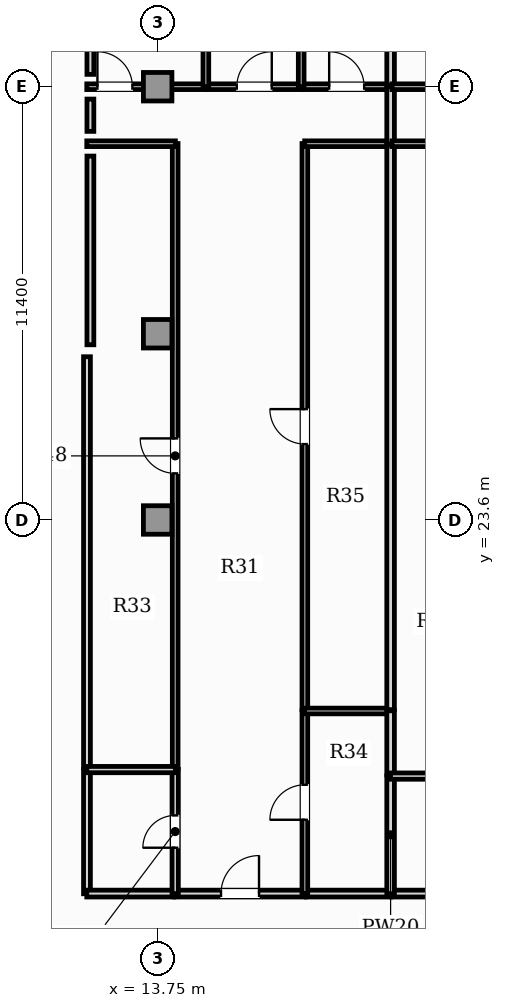
"""IFC4 building model, lengths in metres.
Left out: names, types, materials, properties, quantities, classifications, styles, units other than length and angle.
Written with IfcOpenShell. Run it as: python <this file> out.ifc"""

import sys

from ifc_helpers import new_model, si_unit, direction, frame, frame_2d, origin, origin_2d, place, context, subcontext, project, spatial, rectangle, extrude, element, fill, save


model = new_model("IFC4")
c1 = context("Model", 3, precision=1e-05, world=origin(), true_north=direction((0.0, 1.0)))
c2 = subcontext(c1, "Body", "Model", "MODEL_VIEW")
j1 = project(units=[si_unit("LENGTHUNIT", "METRE"), si_unit("PLANEANGLEUNIT", "RADIAN")], contexts=[c1])
p1 = place(None, origin())
s1 = spatial("IfcSite", under=j1, at=p1, CompositionType="ELEMENT")
p2 = place(p1, origin())
s2 = spatial("IfcBuilding", under=s1, at=p2, CompositionType="ELEMENT")
p3 = place(p2, frame((0.0, 0.0, 119.55)))
s3 = spatial("IfcBuildingStorey", under=s2, at=p3, CompositionType="ELEMENT", Elevation=119.55)
for number, where, z_axis, x_axis in (
    (1, (13.75, 23.6, 0.0), (0.0, 0.0, 1.0), (1.0, 0.0, 0.0)),
    (2, (13.75, 28.5, 0.0), (0.0, 0.0, 1.0), (1.0, 0.0, 0.0)),
    (3, (13.75, 35.0, 0.0), (0.0, 0.0, 1.0), (1.0, 0.0, 0.0)),
):
    element("IfcColumn", number, at=place(p3, frame(where, z_axis=z_axis, x_axis=x_axis)), inside=s3, PredefinedType="COLUMN", context=c2, shape_type="SweptSolid", body=[
        extrude(rectangle(XDim=0.75, YDim=0.75, at=origin_2d()), origin(), (0.0, 0.0, 1.0), 3.85),
    ])
p4 = place(p3, frame((14.206, 13.77, 0.0), z_axis=(0.0, 0.0, 1.0), x_axis=(1.0, 0.0, 0.0)))
e4 = element("IfcWall", 4, at=p4, inside=s3, PredefinedType="PARTITIONING", context=c2, shape_type="SweptSolid", body=[
    extrude(rectangle(XDim=3.422, YDim=0.18, at=frame_2d((1.711, 0.0))), origin(), (0.0, 0.0, 1.0), 3.6),
])
p5 = place(p4, frame((1.211, 0.0, 0.0)))
e5 = element("IfcOpeningElement", 5, at=p5, cuts=e4, PredefinedType="OPENING", context=c2, shape_type="SweptSolid", body=[
    extrude(rectangle(XDim=1.0, YDim=2.15, at=frame_2d((0.5, 1.075))), frame((0.0, 0.1, 0.0), z_axis=(0.0, -1.0, 0.0), x_axis=(1.0, 0.0, 0.0)), (0.0, 0.0, 1.0), 0.2),
])
p6 = place(p3, frame((11.89, 13.765, 0.0), z_axis=(0.0, 0.0, 1.0), x_axis=(0.0, 1.0, 0.0)))
e6 = element("IfcWall", 6, at=p6, inside=s3, PredefinedType="PARTITIONING", context=c2, shape_type="SweptSolid", body=[
    extrude(rectangle(XDim=3.273, YDim=0.18, at=frame_2d((1.636, 0.0))), origin(), (0.0, 0.0, 1.0), 3.6),
])
p7 = place(p3, frame((11.885, 13.77, 0.0), z_axis=(0.0, 0.0, 1.0), x_axis=(1.0, 0.0, 0.0)))
e7 = element("IfcWall", 7, at=p7, inside=s3, PredefinedType="PARTITIONING", context=c2, shape_type="SweptSolid", body=[
    extrude(rectangle(XDim=2.291, YDim=0.18, at=frame_2d((1.146, 0.0))), origin(), (0.0, 0.0, 1.0), 3.6),
])
p8 = place(p3, frame((11.89, 17.068, 0.0), z_axis=(0.0, 0.0, 1.0), x_axis=(0.0, 1.0, 0.0)))
e8 = element("IfcWall", 8, at=p8, inside=s3, PredefinedType="PARTITIONING", context=c2, shape_type="SweptSolid", body=[
    extrude(rectangle(XDim=10.827, YDim=0.18, at=frame_2d((5.414, 0.0))), origin(), (0.0, 0.0, 1.0), 3.6),
])
p9 = place(p3, frame((17.658, 13.77, 0.0), z_axis=(0.0, 0.0, 1.0), x_axis=(1.0, 0.0, 0.0)))
e9 = element("IfcWall", 9, at=p9, inside=s3, PredefinedType="PARTITIONING", context=c2, shape_type="SweptSolid", body=[
    extrude(rectangle(XDim=2.226, YDim=0.18, at=frame_2d((1.113, 0.0))), origin(), (0.0, 0.0, 1.0), 3.6),
])
p10 = place(p3, frame((19.914, 13.77, 0.0), z_axis=(0.0, 0.0, 1.0), x_axis=(1.0, 0.0, 0.0)))
e10 = element("IfcWall", 10, at=p10, inside=s3, PredefinedType="PARTITIONING", context=c2, shape_type="SweptSolid", body=[
    extrude(rectangle(XDim=2.377, YDim=0.18, at=frame_2d((1.188, 0.0))), origin(), (0.0, 0.0, 1.0), 3.6),
])
p11 = place(p3, frame((14.211, 13.765, 0.0), z_axis=(0.0, 0.0, 1.0), x_axis=(0.0, 1.0, 0.0)))
e11 = element("IfcWall", 11, at=p11, inside=s3, PredefinedType="PLUMBINGWALL", context=c2, shape_type="SweptSolid", body=[
    extrude(rectangle(XDim=3.273, YDim=0.165, at=frame_2d((1.636, 0.0))), origin(), (0.0, 0.0, 1.0), 3.6),
])
p12 = place(p11, frame((1.211, 0.0, 0.0)))
e12 = element("IfcOpeningElement", 12, at=p12, cuts=e11, PredefinedType="OPENING", context=c2, shape_type="SweptSolid", body=[
    extrude(rectangle(XDim=0.85, YDim=2.1, at=frame_2d((0.425, 1.05))), frame((0.0, 0.093, 0.0), z_axis=(0.0, -1.0, 0.0), x_axis=(1.0, 0.0, 0.0)), (0.0, 0.0, 1.0), 0.185),
])
p13 = place(p3, frame((14.211, 17.068, 0.0), z_axis=(0.0, 0.0, 1.0), x_axis=(0.0, 1.0, 0.0)))
e13 = element("IfcWall", 13, at=p13, inside=s3, PredefinedType="PARTITIONING", context=c2, shape_type="SweptSolid", body=[
    extrude(rectangle(XDim=16.437, YDim=0.15, at=frame_2d((8.219, 0.0))), origin(), (0.0, 0.0, 1.0), 3.6),
])
p14 = place(p13, frame((7.759, 0.0, 0.0)))
e14 = element("IfcOpeningElement", 14, at=p14, cuts=e13, PredefinedType="OPENING", context=c2, shape_type="SweptSolid", body=[
    extrude(rectangle(XDim=0.92, YDim=2.1, at=frame_2d((0.46, 1.05))), frame((0.0, 0.085, 0.0), z_axis=(0.0, -1.0, 0.0), x_axis=(1.0, 0.0, 0.0)), (0.0, 0.0, 1.0), 0.17),
])
p15 = place(p3, frame((11.885, 33.5, 0.0), z_axis=(0.0, 0.0, 1.0), x_axis=(1.0, 0.0, 0.0)))
e15 = element("IfcWall", 15, at=p15, inside=s3, PredefinedType="PARTITIONING", context=c2, shape_type="SweptSolid", body=[
    extrude(rectangle(XDim=2.331, YDim=0.15, at=frame_2d((1.166, 0.0))), origin(), (0.0, 0.0, 1.0), 3.6),
])
p16 = place(p3, frame((17.623, 13.765, 0.0), z_axis=(0.0, 0.0, 1.0), x_axis=(0.0, 1.0, 0.0)))
e16 = element("IfcWall", 16, at=p16, inside=s3, PredefinedType="PARTITIONING", context=c2, shape_type="SweptSolid", body=[
    extrude(rectangle(XDim=4.814, YDim=0.15, at=frame_2d((2.407, 0.0))), origin(), (0.0, 0.0, 1.0), 3.6),
])
p17 = place(p16, frame((1.947, 0.0, 0.0)))
e17 = element("IfcOpeningElement", 17, at=p17, cuts=e16, PredefinedType="OPENING", context=c2, shape_type="SweptSolid", body=[
    extrude(rectangle(XDim=0.92, YDim=2.1, at=frame_2d((0.46, 1.05))), frame((0.0, 0.085, 0.0), z_axis=(0.0, -1.0, 0.0), x_axis=(1.0, 0.0, 0.0)), (0.0, 0.0, 1.0), 0.17),
])
p18 = place(p3, frame((17.623, 18.609, 0.0), z_axis=(0.0, 0.0, 1.0), x_axis=(0.0, 1.0, 0.0)))
e18 = element("IfcWall", 18, at=p18, inside=s3, PredefinedType="PARTITIONING", context=c2, shape_type="SweptSolid", body=[
    extrude(rectangle(XDim=14.896, YDim=0.15, at=frame_2d((7.448, 0.0))), origin(), (0.0, 0.0, 1.0), 3.6),
])
p19 = place(p18, frame((6.988, 0.0, 0.0)))
e19 = element("IfcOpeningElement", 19, at=p19, cuts=e18, PredefinedType="OPENING", context=c2, shape_type="SweptSolid", body=[
    extrude(rectangle(XDim=0.92, YDim=2.1, at=frame_2d((0.46, 1.05))), frame((0.0, 0.085, 0.0), z_axis=(0.0, -1.0, 0.0), x_axis=(1.0, 0.0, 0.0)), (0.0, 0.0, 1.0), 0.17),
])
p20 = place(p3, frame((17.618, 33.5, 0.0), z_axis=(0.0, 0.0, 1.0), x_axis=(1.0, 0.0, 0.0)))
e20 = element("IfcWall", 20, at=p20, inside=s3, PredefinedType="PARTITIONING", context=c2, shape_type="SweptSolid", body=[
    extrude(rectangle(XDim=2.266, YDim=0.15, at=frame_2d((1.133, 0.0))), origin(), (0.0, 0.0, 1.0), 3.6),
])
p21 = place(p3, frame((11.885, 35.0, 0.0), z_axis=(0.0, 0.0, 1.0), x_axis=(1.0, 0.0, 0.0)))
e21 = element("IfcWall", 21, at=p21, inside=s3, PredefinedType="PARTITIONING", context=c2, shape_type="SweptSolid", body=[
    extrude(rectangle(XDim=3.139, YDim=0.15, at=frame_2d((1.569, 0.0))), origin(), (0.0, 0.0, 1.0), 2.983),
])
p22 = place(p21, frame((0.28, 0.0, 0.0)))
e22 = element("IfcOpeningElement", 22, at=p22, cuts=e21, PredefinedType="OPENING", context=c2, shape_type="SweptSolid", body=[
    extrude(rectangle(XDim=0.92, YDim=2.1, at=frame_2d((0.46, 1.05))), frame((0.0, 0.085, 0.0), z_axis=(0.0, -1.0, 0.0), x_axis=(1.0, 0.0, 0.0)), (0.0, 0.0, 1.0), 0.17),
])
p23 = place(p3, frame((15.054, 35.0, 0.0), z_axis=(0.0, 0.0, 1.0), x_axis=(1.0, 0.0, 0.0)))
e23 = element("IfcWall", 23, at=p23, inside=s3, PredefinedType="PARTITIONING", context=c2, shape_type="SweptSolid", body=[
    extrude(rectangle(XDim=2.478, YDim=0.15, at=frame_2d((1.239, 0.0))), origin(), (0.0, 0.0, 1.0), 2.983),
])
p24 = place(p23, frame((0.779, 0.0, 0.0)))
e24 = element("IfcOpeningElement", 24, at=p24, cuts=e23, PredefinedType="OPENING", context=c2, shape_type="SweptSolid", body=[
    extrude(rectangle(XDim=0.92, YDim=2.1, at=frame_2d((0.46, 1.05))), frame((0.0, 0.085, 0.0), z_axis=(0.0, -1.0, 0.0), x_axis=(1.0, 0.0, 0.0)), (0.0, 0.0, 1.0), 0.17),
])
p25 = place(p3, frame((17.562, 35.0, 0.0), z_axis=(0.0, 0.0, 1.0), x_axis=(1.0, 0.0, 0.0)))
e25 = element("IfcWall", 25, at=p25, inside=s3, PredefinedType="PARTITIONING", context=c2, shape_type="SweptSolid", body=[
    extrude(rectangle(XDim=2.323, YDim=0.15, at=frame_2d((1.161, 0.0))), origin(), (0.0, 0.0, 1.0), 2.983),
])
p26 = place(p25, frame((0.701, 0.0, 0.0)))
e26 = element("IfcOpeningElement", 26, at=p26, cuts=e25, PredefinedType="OPENING", context=c2, shape_type="SweptSolid", body=[
    extrude(rectangle(XDim=0.92, YDim=2.1, at=frame_2d((0.46, 1.05))), frame((0.0, 0.085, 0.0), z_axis=(0.0, -1.0, 0.0), x_axis=(1.0, 0.0, 0.0)), (0.0, 0.0, 1.0), 0.17),
])
p27 = place(p3, frame((19.879, 33.495, 0.0), z_axis=(0.0, 0.0, 1.0), x_axis=(0.0, 1.0, 0.0)))
e27 = element("IfcWall", 27, at=p27, inside=s3, PredefinedType="PARTITIONING", context=c2, shape_type="SweptSolid", body=[
    extrude(rectangle(XDim=1.51, YDim=0.2, at=frame_2d((0.755, 0.0))), origin(), (0.0, 0.0, 1.0), 3.6),
])
p28 = place(p3, frame((11.885, 17.033, 0.0), z_axis=(0.0, 0.0, 1.0), x_axis=(1.0, 0.0, 0.0)))
e28 = element("IfcWall", 28, at=p28, inside=s3, PredefinedType="PLUMBINGWALL", context=c2, shape_type="SweptSolid", body=[
    extrude(rectangle(XDim=2.331, YDim=0.165, at=frame_2d((1.166, 0.0))), origin(), (0.0, 0.0, 1.0), 3.6),
])
p29 = place(p3, frame((17.618, 18.574, 0.0), z_axis=(0.0, 0.0, 1.0), x_axis=(1.0, 0.0, 0.0)))
e29 = element("IfcWall", 29, at=p29, inside=s3, PredefinedType="PARTITIONING", context=c2, shape_type="SweptSolid", body=[
    extrude(rectangle(XDim=2.266, YDim=0.15, at=frame_2d((1.133, 0.0))), origin(), (0.0, 0.0, 1.0), 3.6),
])
p30 = place(p3, frame((19.879, 13.765, 0.0), z_axis=(0.0, 0.0, 1.0), x_axis=(0.0, 1.0, 0.0)))
e30 = element("IfcWall", 30, at=p30, inside=s3, PredefinedType="PARTITIONING", context=c2, shape_type="SweptSolid", body=[
    extrude(rectangle(XDim=3.101, YDim=0.2, at=frame_2d((1.551, 0.0))), origin(), (0.0, 0.0, 1.0), 3.6),
])
p31 = place(p3, frame((19.879, 16.896, 0.0), z_axis=(0.0, 0.0, 1.0), x_axis=(0.0, 1.0, 0.0)))
e31 = element("IfcWall", 31, at=p31, inside=s3, PredefinedType="PARTITIONING", context=c2, shape_type="SweptSolid", body=[
    extrude(rectangle(XDim=1.683, YDim=0.2, at=frame_2d((0.842, 0.0))), origin(), (0.0, 0.0, 1.0), 3.6),
])
p32 = place(p3, frame((19.879, 18.609, 0.0), z_axis=(0.0, 0.0, 1.0), x_axis=(0.0, 1.0, 0.0)))
e32 = element("IfcWall", 32, at=p32, inside=s3, PredefinedType="PARTITIONING", context=c2, shape_type="SweptSolid", body=[
    extrude(rectangle(XDim=14.856, YDim=0.2, at=frame_2d((7.428, 0.0))), origin(), (0.0, 0.0, 1.0), 3.6),
])
p33 = place(p3, frame((15.019, 34.995, 0.0), z_axis=(0.0, 0.0, 1.0), x_axis=(0.0, 1.0, 0.0)))
e33 = element("IfcWall", 33, at=p33, inside=s3, PredefinedType="PARTITIONING", context=c2, shape_type="SweptSolid", body=[
    extrude(rectangle(XDim=7.907, YDim=0.15, at=frame_2d((3.954, 0.0))), origin(), (0.0, 0.0, 1.0), 3.6),
])
p34 = place(p3, frame((17.527, 34.995, 0.0), z_axis=(0.0, 0.0, 1.0), x_axis=(0.0, 1.0, 0.0)))
e34 = element("IfcWall", 34, at=p34, inside=s3, PredefinedType="PARTITIONING", context=c2, shape_type="SweptSolid", body=[
    extrude(rectangle(XDim=7.995, YDim=0.15, at=frame_2d((3.998, 0.0))), origin(), (0.0, 0.0, 1.0), 3.6),
])
p35 = place(p3, frame((19.879, 35.035, 0.0), z_axis=(0.0, 0.0, 1.0), x_axis=(0.0, 1.0, 0.0)))
e35 = element("IfcWall", 35, at=p35, inside=s3, PredefinedType="PARTITIONING", context=c2, shape_type="SweptSolid", body=[
    extrude(rectangle(XDim=7.955, YDim=0.2, at=frame_2d((3.978, 0.0))), origin(), (0.0, 0.0, 1.0), 3.6),
])
p36 = place(p3, frame((19.914, 33.5, 0.0), z_axis=(0.0, 0.0, 1.0), x_axis=(1.0, 0.0, 0.0)))
e36 = element("IfcWall", 36, at=p36, inside=s3, PredefinedType="PARTITIONING", context=c2, shape_type="SweptSolid", body=[
    extrude(rectangle(XDim=2.417, YDim=0.15, at=frame_2d((1.208, 0.0))), origin(), (0.0, 0.0, 1.0), 3.6),
])
p37 = place(p3, frame((19.914, 35.0, 0.0), z_axis=(0.0, 0.0, 1.0), x_axis=(1.0, 0.0, 0.0)))
e37 = element("IfcWall", 37, at=p37, inside=s3, PredefinedType="PARTITIONING", context=c2, shape_type="SweptSolid", body=[
    extrude(rectangle(XDim=3.331, YDim=0.15, at=frame_2d((1.666, 0.0))), origin(), (0.0, 0.0, 1.0), 2.983),
])
p38 = place(p37, frame((2.131, 0.0, 0.0)))
e38 = element("IfcOpeningElement", 38, at=p38, cuts=e37, PredefinedType="OPENING", context=c2, shape_type="SweptSolid", body=[
    extrude(rectangle(XDim=0.92, YDim=2.1, at=frame_2d((0.46, 1.05))), frame((0.0, 0.085, 0.0), z_axis=(0.0, -1.0, 0.0), x_axis=(1.0, 0.0, 0.0)), (0.0, 0.0, 1.0), 0.17),
])
p39 = place(p3, frame((19.874, 16.861, 0.0), z_axis=(0.0, 0.0, 1.0), x_axis=(1.0, 0.0, 0.0)))
e39 = element("IfcWall", 39, at=p39, inside=s3, PredefinedType="PLUMBINGWALL", context=c2, shape_type="SweptSolid", body=[
    extrude(rectangle(XDim=2.457, YDim=0.165, at=frame_2d((1.229, 0.0))), origin(), (0.0, 0.0, 1.0), 3.6),
])
p40 = place(p3, frame((11.98, 33.825, 0.0), z_axis=(0.0, 0.0, 1.0), x_axis=(0.0, 1.0, 0.0)))
e40 = element("IfcWall", 40, at=p40, inside=s3, PredefinedType="PARTITIONING", context=c2, shape_type="SweptSolid", body=[
    extrude(rectangle(XDim=0.85, YDim=0.18, at=frame_2d((0.425, 0.0))), origin(), (0.0, 0.0, 1.0), 3.6),
])
p41 = place(p3, frame((11.98, 28.21, 0.0), z_axis=(0.0, 0.0, 1.0), x_axis=(0.0, 1.0, 0.0)))
e41 = element("IfcWall", 41, at=p41, inside=s3, PredefinedType="PARTITIONING", context=c2, shape_type="SweptSolid", body=[
    extrude(rectangle(XDim=4.965, YDim=0.18, at=frame_2d((2.482, 0.0))), origin(), (0.0, 0.0, 1.0), 3.6),
])
p42 = place(p3, frame((11.98, 35.325, 0.0), z_axis=(0.0, 0.0, 1.0), x_axis=(0.0, 1.0, 0.0)))
e42 = element("IfcWall", 42, at=p42, inside=s3, PredefinedType="PARTITIONING", context=c2, shape_type="SweptSolid", body=[
    extrude(rectangle(XDim=7.665, YDim=0.18, at=frame_2d((3.833, 0.0))), origin(), (0.0, 0.0, 1.0), 3.6),
])
p43 = place(p5, origin())
e43 = element("IfcDoor", 43, at=p43, inside=s3, OperationType="SINGLE_SWING_RIGHT", PredefinedType="DOOR", context=c2, shape_type="SweptSolid", body=[
    extrude(rectangle(XDim=1.0, YDim=2.15, at=frame_2d((0.5, 1.075))), frame((0.0, 0.025, 0.0), z_axis=(0.0, -1.0, 0.0), x_axis=(1.0, 0.0, 0.0)), (0.0, 0.0, 1.0), 0.05),
])
fill(e5, e43)
p44 = place(p12, origin())
e44 = element("IfcDoor", 44, at=p44, inside=s3, OperationType="SINGLE_SWING_LEFT", PredefinedType="DOOR", context=c2, shape_type="SweptSolid", body=[
    extrude(rectangle(XDim=0.85, YDim=2.1, at=frame_2d((0.425, 1.05))), frame((0.0, 0.025, 0.0), z_axis=(0.0, -1.0, 0.0), x_axis=(1.0, 0.0, 0.0)), (0.0, 0.0, 1.0), 0.05),
])
fill(e12, e44)
p45 = place(p14, origin())
e45 = element("IfcDoor", 45, at=p45, inside=s3, OperationType="SINGLE_SWING_RIGHT", PredefinedType="DOOR", context=c2, shape_type="SweptSolid", body=[
    extrude(rectangle(XDim=0.92, YDim=2.1, at=frame_2d((0.46, 1.05))), frame((0.0, 0.025, 0.0), z_axis=(0.0, -1.0, 0.0), x_axis=(1.0, 0.0, 0.0)), (0.0, 0.0, 1.0), 0.05),
])
fill(e14, e45)
p46 = place(p17, origin())
e46 = element("IfcDoor", 46, at=p46, inside=s3, OperationType="SINGLE_SWING_LEFT", PredefinedType="DOOR", context=c2, shape_type="SweptSolid", body=[
    extrude(rectangle(XDim=0.92, YDim=2.1, at=frame_2d((0.46, 1.05))), frame((0.0, 0.025, 0.0), z_axis=(0.0, -1.0, 0.0), x_axis=(1.0, 0.0, 0.0)), (0.0, 0.0, 1.0), 0.05),
])
fill(e17, e46)
p47 = place(p19, origin())
e47 = element("IfcDoor", 47, at=p47, inside=s3, OperationType="SINGLE_SWING_RIGHT", PredefinedType="DOOR", context=c2, shape_type="SweptSolid", body=[
    extrude(rectangle(XDim=0.92, YDim=2.1, at=frame_2d((0.46, 1.05))), frame((0.0, 0.025, 0.0), z_axis=(0.0, -1.0, 0.0), x_axis=(1.0, 0.0, 0.0)), (0.0, 0.0, 1.0), 0.05),
])
fill(e19, e47)
p48 = place(p22, origin())
e48 = element("IfcDoor", 48, at=p48, inside=s3, OperationType="SINGLE_SWING_LEFT", PredefinedType="DOOR", context=c2, shape_type="SweptSolid", body=[
    extrude(rectangle(XDim=0.92, YDim=2.1, at=frame_2d((0.46, 1.05))), frame((0.0, 0.025, 0.0), z_axis=(0.0, -1.0, 0.0), x_axis=(1.0, 0.0, 0.0)), (0.0, 0.0, 1.0), 0.05),
])
fill(e22, e48)
p49 = place(p24, origin())
e49 = element("IfcDoor", 49, at=p49, inside=s3, OperationType="SINGLE_SWING_RIGHT", PredefinedType="DOOR", context=c2, shape_type="SweptSolid", body=[
    extrude(rectangle(XDim=0.92, YDim=2.1, at=frame_2d((0.46, 1.05))), frame((0.0, 0.025, 0.0), z_axis=(0.0, -1.0, 0.0), x_axis=(1.0, 0.0, 0.0)), (0.0, 0.0, 1.0), 0.05),
])
fill(e24, e49)
p50 = place(p26, origin())
e50 = element("IfcDoor", 50, at=p50, inside=s3, OperationType="SINGLE_SWING_LEFT", PredefinedType="DOOR", context=c2, shape_type="SweptSolid", body=[
    extrude(rectangle(XDim=0.92, YDim=2.1, at=frame_2d((0.46, 1.05))), frame((0.0, 0.025, 0.0), z_axis=(0.0, -1.0, 0.0), x_axis=(1.0, 0.0, 0.0)), (0.0, 0.0, 1.0), 0.05),
])
fill(e26, e50)
save(model, sys.argv[1])
